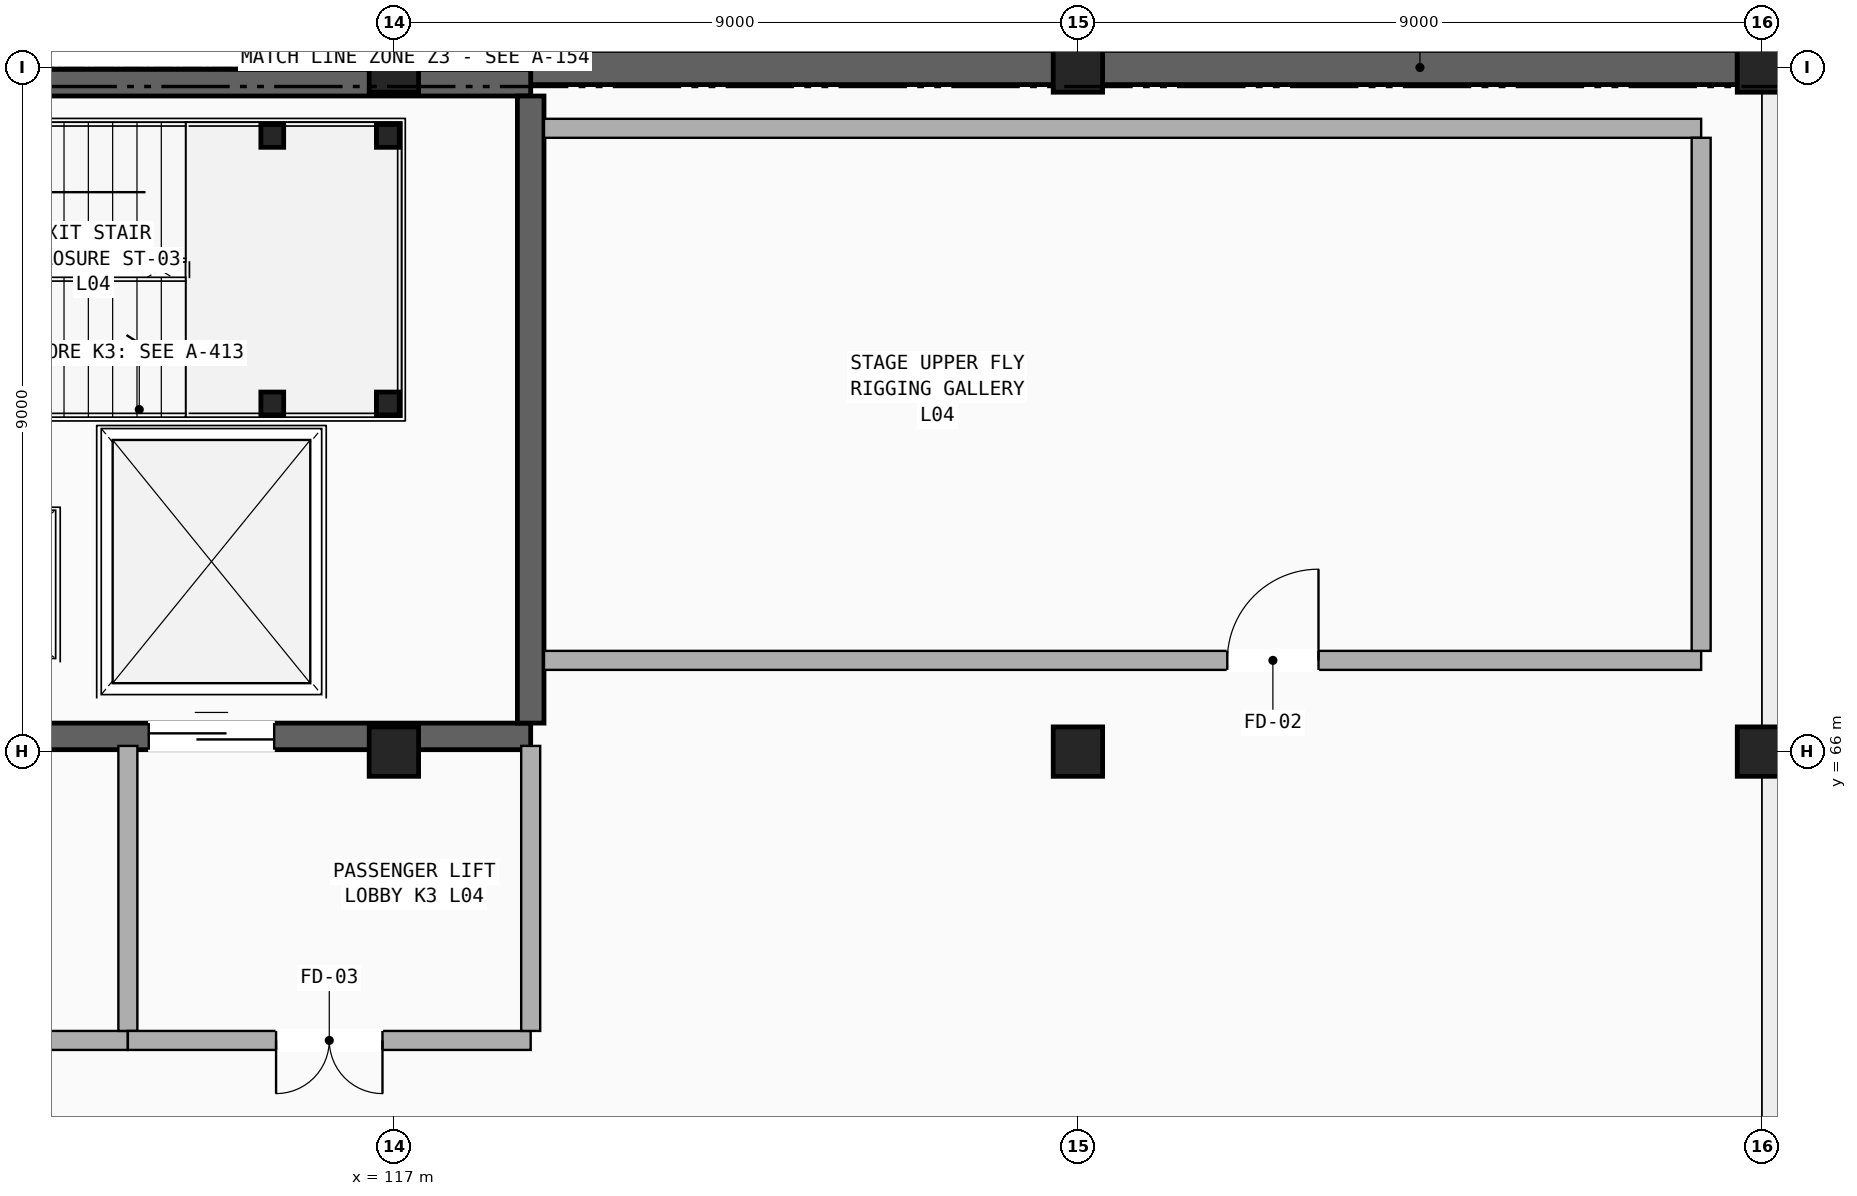
"""IFC4 building model, lengths in metres.
Left out: names, types, materials, properties, quantities, classifications, styles, units other than length and angle.
Written with IfcOpenShell. Run it as: python <this file> out.ifc"""

import sys

from ifc_helpers import new_model, si_unit, direction, frame, frame_2d, origin, origin_2d, place, context, subcontext, project, spatial, rectangle, hollow_rectangle, extrude, element, fill, save


model = new_model("IFC4")
c1 = context("Model", 3, precision=1e-05, world=origin(), true_north=direction((0.0, 1.0)))
c2 = subcontext(c1, "Body", "Model", "MODEL_VIEW")
j1 = project(units=[si_unit("LENGTHUNIT", "METRE"), si_unit("PLANEANGLEUNIT", "RADIAN")], contexts=[c1])
p1 = place(None, origin())
s1 = spatial("IfcSite", under=j1, at=p1, CompositionType="ELEMENT")
p2 = place(p1, origin())
s2 = spatial("IfcBuilding", under=s1, at=p2, CompositionType="ELEMENT")
p3 = place(p2, frame((0.0, 0.0, 17.68)))
s3 = spatial("IfcBuildingStorey", under=s2, at=p3, CompositionType="ELEMENT", Elevation=17.68)
for number, where, z_axis, x_axis in (
    (1, (117.0, 66.0, 0.0), (0.0, 0.0, 1.0), (1.0, 0.0, 0.0)),
    (2, (117.0, 75.0, 0.0), (0.0, 0.0, 1.0), (1.0, 0.0, 0.0)),
    (3, (126.0, 66.0, 0.0), (0.0, 0.0, 1.0), (1.0, 0.0, 0.0)),
    (4, (126.0, 75.0, 0.0), (0.0, 0.0, 1.0), (1.0, 0.0, 0.0)),
    (5, (135.0, 66.0, 0.0), (0.0, 0.0, 1.0), (1.0, 0.0, 0.0)),
    (6, (135.0, 75.0, 0.0), (0.0, 0.0, 1.0), (1.0, 0.0, 0.0)),
):
    element("IfcColumn", number, at=place(p3, frame(where, z_axis=z_axis, x_axis=x_axis)), inside=s3, PredefinedType="COLUMN", context=c2, shape_type="SweptSolid", body=[
        extrude(rectangle(XDim=0.65, YDim=0.65, at=origin_2d()), origin(), (0.0, 0.0, 1.0), 4.08),
    ])
p4 = place(p3, frame((118.8, 75.0, 0.0), z_axis=(0.0, 0.0, 1.0), x_axis=(1.0, 0.0, 0.0)))
e7 = element("IfcWall", 7, at=p4, inside=s3, PredefinedType="SHEAR", context=c2, shape_type="SweptSolid", body=[
    extrude(rectangle(XDim=15.875, YDim=0.45, at=frame_2d((7.938, 0.0))), origin(), (0.0, 0.0, 1.0), 4.08),
])
p5 = place(p3, frame((108.5, 66.2, 0.0), z_axis=(0.0, 0.0, 1.0), x_axis=(1.0, 0.0, 0.0)))
e8 = element("IfcWall", 8, at=p5, inside=s3, PredefinedType="SHEAR", context=c2, shape_type="SweptSolid", body=[
    extrude(rectangle(XDim=10.3, YDim=0.35, at=frame_2d((5.15, 0.0))), origin(), (0.0, 0.0, 1.0), 4.08),
])
p6 = place(p5, frame((0.45, 0.0, 0.0)))
e9 = element("IfcOpeningElement", 9, at=p6, cuts=e8, PredefinedType="OPENING", context=c2, shape_type="SweptSolid", body=[
    extrude(rectangle(XDim=1.1, YDim=2.2, at=frame_2d((0.55, 1.1))), frame((0.0, 0.185, 0.0), z_axis=(0.0, -1.0, 0.0), x_axis=(1.0, 0.0, 0.0)), (0.0, 0.0, 1.0), 0.37),
])
p7 = place(p5, frame((2.09, 0.0, 0.0)))
e10 = element("IfcOpeningElement", 10, at=p7, cuts=e8, PredefinedType="OPENING", context=c2, shape_type="SweptSolid", body=[
    extrude(rectangle(XDim=1.22, YDim=2.2, at=frame_2d((0.61, 1.1))), frame((0.0, 0.185, 0.0), z_axis=(0.0, -1.0, 0.0), x_axis=(1.0, 0.0, 0.0)), (0.0, 0.0, 1.0), 0.37),
])
p8 = place(p5, frame((5.275, 0.0, 0.0)))
e11 = element("IfcOpeningElement", 11, at=p8, cuts=e8, PredefinedType="OPENING", context=c2, shape_type="SweptSolid", body=[
    extrude(rectangle(XDim=1.65, YDim=2.34, at=frame_2d((0.825, 1.17))), frame((0.0, 0.185, 0.0), z_axis=(0.0, -1.0, 0.0), x_axis=(1.0, 0.0, 0.0)), (0.0, 0.0, 1.0), 0.37),
])
p9 = place(p3, frame((108.5, 74.8, 0.0), z_axis=(0.0, 0.0, 1.0), x_axis=(1.0, 0.0, 0.0)))
e12 = element("IfcWall", 12, at=p9, inside=s3, PredefinedType="SHEAR", context=c2, shape_type="SweptSolid", body=[
    extrude(rectangle(XDim=10.3, YDim=0.35, at=frame_2d((5.15, 0.0))), origin(), (0.0, 0.0, 1.0), 4.08),
])
p10 = place(p3, frame((118.8, 66.375, 0.0), z_axis=(0.0, 0.0, 1.0), x_axis=(0.0, 1.0, 0.0)))
e13 = element("IfcWall", 13, at=p10, inside=s3, PredefinedType="SHEAR", context=c2, shape_type="SweptSolid", body=[
    extrude(rectangle(XDim=8.25, YDim=0.35, at=frame_2d((4.125, 0.0))), origin(), (0.0, 0.0, 1.0), 4.08),
])
for number, where, z_axis, x_axis in (
    (14, (115.4, 70.58, 0.0), (0.0, 0.0, 1.0), (1.0, 0.0, 0.0)),
    (15, (115.4, 74.1, 0.0), (0.0, 0.0, 1.0), (1.0, 0.0, 0.0)),
    (16, (116.92, 70.58, 0.0), (0.0, 0.0, 1.0), (1.0, 0.0, 0.0)),
    (17, (116.92, 74.1, 0.0), (0.0, 0.0, 1.0), (1.0, 0.0, 0.0)),
):
    element("IfcColumn", number, at=place(p3, frame(where, z_axis=z_axis, x_axis=x_axis)), inside=s3, PredefinedType="COLUMN", context=c2, shape_type="SweptSolid", body=[
        extrude(hollow_rectangle(XDim=0.3, YDim=0.3, WallThickness=0.016, InnerFilletRadius=0.016, OuterFilletRadius=0.032, at=origin_2d()), origin(), (0.0, 0.0, 1.0), 4.08),
    ])
p11 = place(p3, frame((108.5, 62.2, 0.0), z_axis=(0.0, 0.0, 1.0), x_axis=(1.0, 0.0, 0.0)))
e18 = element("IfcWall", 18, at=p11, inside=s3, PredefinedType="PARTITIONING", context=c2, shape_type="SweptSolid", body=[
    extrude(rectangle(XDim=5.0, YDim=0.25, at=frame_2d((2.5, 0.0))), origin(), (0.0, 0.0, 1.0), 3.84),
])
p12 = place(p11, frame((1.95, 0.0, 0.0)))
e19 = element("IfcOpeningElement", 19, at=p12, cuts=e18, PredefinedType="OPENING", context=c2, shape_type="SweptSolid", body=[
    extrude(rectangle(XDim=1.1, YDim=2.2, at=frame_2d((0.55, 1.1))), frame((0.0, 0.135, 0.0), z_axis=(0.0, -1.0, 0.0), x_axis=(1.0, 0.0, 0.0)), (0.0, 0.0, 1.0), 0.27),
])
p13 = place(p3, frame((113.5, 62.325, 0.0), z_axis=(0.0, 0.0, 1.0), x_axis=(0.0, 1.0, 0.0)))
e20 = element("IfcWall", 20, at=p13, inside=s3, PredefinedType="PARTITIONING", context=c2, shape_type="SweptSolid", body=[
    extrude(rectangle(XDim=3.75, YDim=0.25, at=frame_2d((1.875, 0.0))), origin(), (0.0, 0.0, 1.0), 2.97),
])
p14 = place(p3, frame((113.5, 62.2, 0.0), z_axis=(0.0, 0.0, 1.0), x_axis=(1.0, 0.0, 0.0)))
e21 = element("IfcWall", 21, at=p14, inside=s3, PredefinedType="PARTITIONING", context=c2, shape_type="SweptSolid", body=[
    extrude(rectangle(XDim=5.3, YDim=0.25, at=frame_2d((2.65, 0.0))), origin(), (0.0, 0.0, 1.0), 3.84),
])
p15 = place(p14, frame((1.95, 0.0, 0.0)))
e22 = element("IfcOpeningElement", 22, at=p15, cuts=e21, PredefinedType="OPENING", context=c2, shape_type="SweptSolid", body=[
    extrude(rectangle(XDim=1.4, YDim=2.2, at=frame_2d((0.7, 1.1))), frame((0.0, 0.135, 0.0), z_axis=(0.0, -1.0, 0.0), x_axis=(1.0, 0.0, 0.0)), (0.0, 0.0, 1.0), 0.27),
])
p16 = place(p3, frame((118.8, 62.325, 0.0), z_axis=(0.0, 0.0, 1.0), x_axis=(0.0, 1.0, 0.0)))
e23 = element("IfcWall", 23, at=p16, inside=s3, PredefinedType="PARTITIONING", context=c2, shape_type="SweptSolid", body=[
    extrude(rectangle(XDim=3.75, YDim=0.25, at=frame_2d((1.875, 0.0))), origin(), (0.0, 0.0, 1.0), 2.97),
])
p17 = place(p3, frame((118.975, 67.2, 0.0), z_axis=(0.0, 0.0, 1.0), x_axis=(1.0, 0.0, 0.0)))
e24 = element("IfcWall", 24, at=p17, inside=s3, PredefinedType="PARTITIONING", context=c2, shape_type="SweptSolid", body=[
    extrude(rectangle(XDim=15.225, YDim=0.25, at=frame_2d((7.612, 0.0))), origin(), (0.0, 0.0, 1.0), 2.97),
])
p18 = place(p17, frame((8.99, 0.0, 0.0)))
e25 = element("IfcOpeningElement", 25, at=p18, cuts=e24, PredefinedType="OPENING", context=c2, shape_type="SweptSolid", body=[
    extrude(rectangle(XDim=1.2, YDim=2.2, at=frame_2d((0.6, 1.1))), frame((0.0, 0.135, 0.0), z_axis=(0.0, -1.0, 0.0), x_axis=(1.0, 0.0, 0.0)), (0.0, 0.0, 1.0), 0.27),
])
p19 = place(p3, frame((118.975, 74.2, 0.0), z_axis=(0.0, 0.0, 1.0), x_axis=(1.0, 0.0, 0.0)))
e26 = element("IfcWall", 26, at=p19, inside=s3, PredefinedType="PARTITIONING", context=c2, shape_type="SweptSolid", body=[
    extrude(rectangle(XDim=15.225, YDim=0.25, at=frame_2d((7.612, 0.0))), origin(), (0.0, 0.0, 1.0), 2.97),
])
p20 = place(p3, frame((134.2, 67.325, 0.0), z_axis=(0.0, 0.0, 1.0), x_axis=(0.0, 1.0, 0.0)))
e27 = element("IfcWall", 27, at=p20, inside=s3, PredefinedType="PARTITIONING", context=c2, shape_type="SweptSolid", body=[
    extrude(rectangle(XDim=6.75, YDim=0.25, at=frame_2d((3.375, 0.0))), origin(), (0.0, 0.0, 1.0), 3.403),
])
p21 = place(p8, origin())
e28 = element("IfcDoor", 28, at=p21, inside=s3, OperationType="SLIDING_TO_LEFT", PredefinedType="DOOR", context=c2, shape_type="SweptSolid", body=[
    extrude(rectangle(XDim=1.65, YDim=2.34, at=frame_2d((0.825, 1.17))), frame((0.0, 0.025, 0.0), z_axis=(0.0, -1.0, 0.0), x_axis=(1.0, 0.0, 0.0)), (0.0, 0.0, 1.0), 0.05),
])
fill(e11, e28)
p22 = place(p15, frame((1.4, 0.0, 0.0), z_axis=(0.0, 0.0, 1.0), x_axis=(-1.0, 0.0, 0.0)))
e29 = element("IfcDoor", 29, at=p22, inside=s3, OperationType="DOUBLE_DOOR_SINGLE_SWING", PredefinedType="DOOR", context=c2, shape_type="SweptSolid", body=[
    extrude(rectangle(XDim=1.4, YDim=2.2, at=frame_2d((0.7, 1.1))), frame((0.0, 0.025, 0.0), z_axis=(0.0, -1.0, 0.0), x_axis=(1.0, 0.0, 0.0)), (0.0, 0.0, 1.0), 0.05),
])
fill(e22, e29)
p23 = place(p18, origin())
e30 = element("IfcDoor", 30, at=p23, inside=s3, OperationType="SINGLE_SWING_RIGHT", PredefinedType="DOOR", context=c2, shape_type="SweptSolid", body=[
    extrude(rectangle(XDim=1.2, YDim=2.2, at=frame_2d((0.6, 1.1))), frame((0.0, 0.025, 0.0), z_axis=(0.0, -1.0, 0.0), x_axis=(1.0, 0.0, 0.0)), (0.0, 0.0, 1.0), 0.05),
])
fill(e25, e30)
save(model, sys.argv[1])
